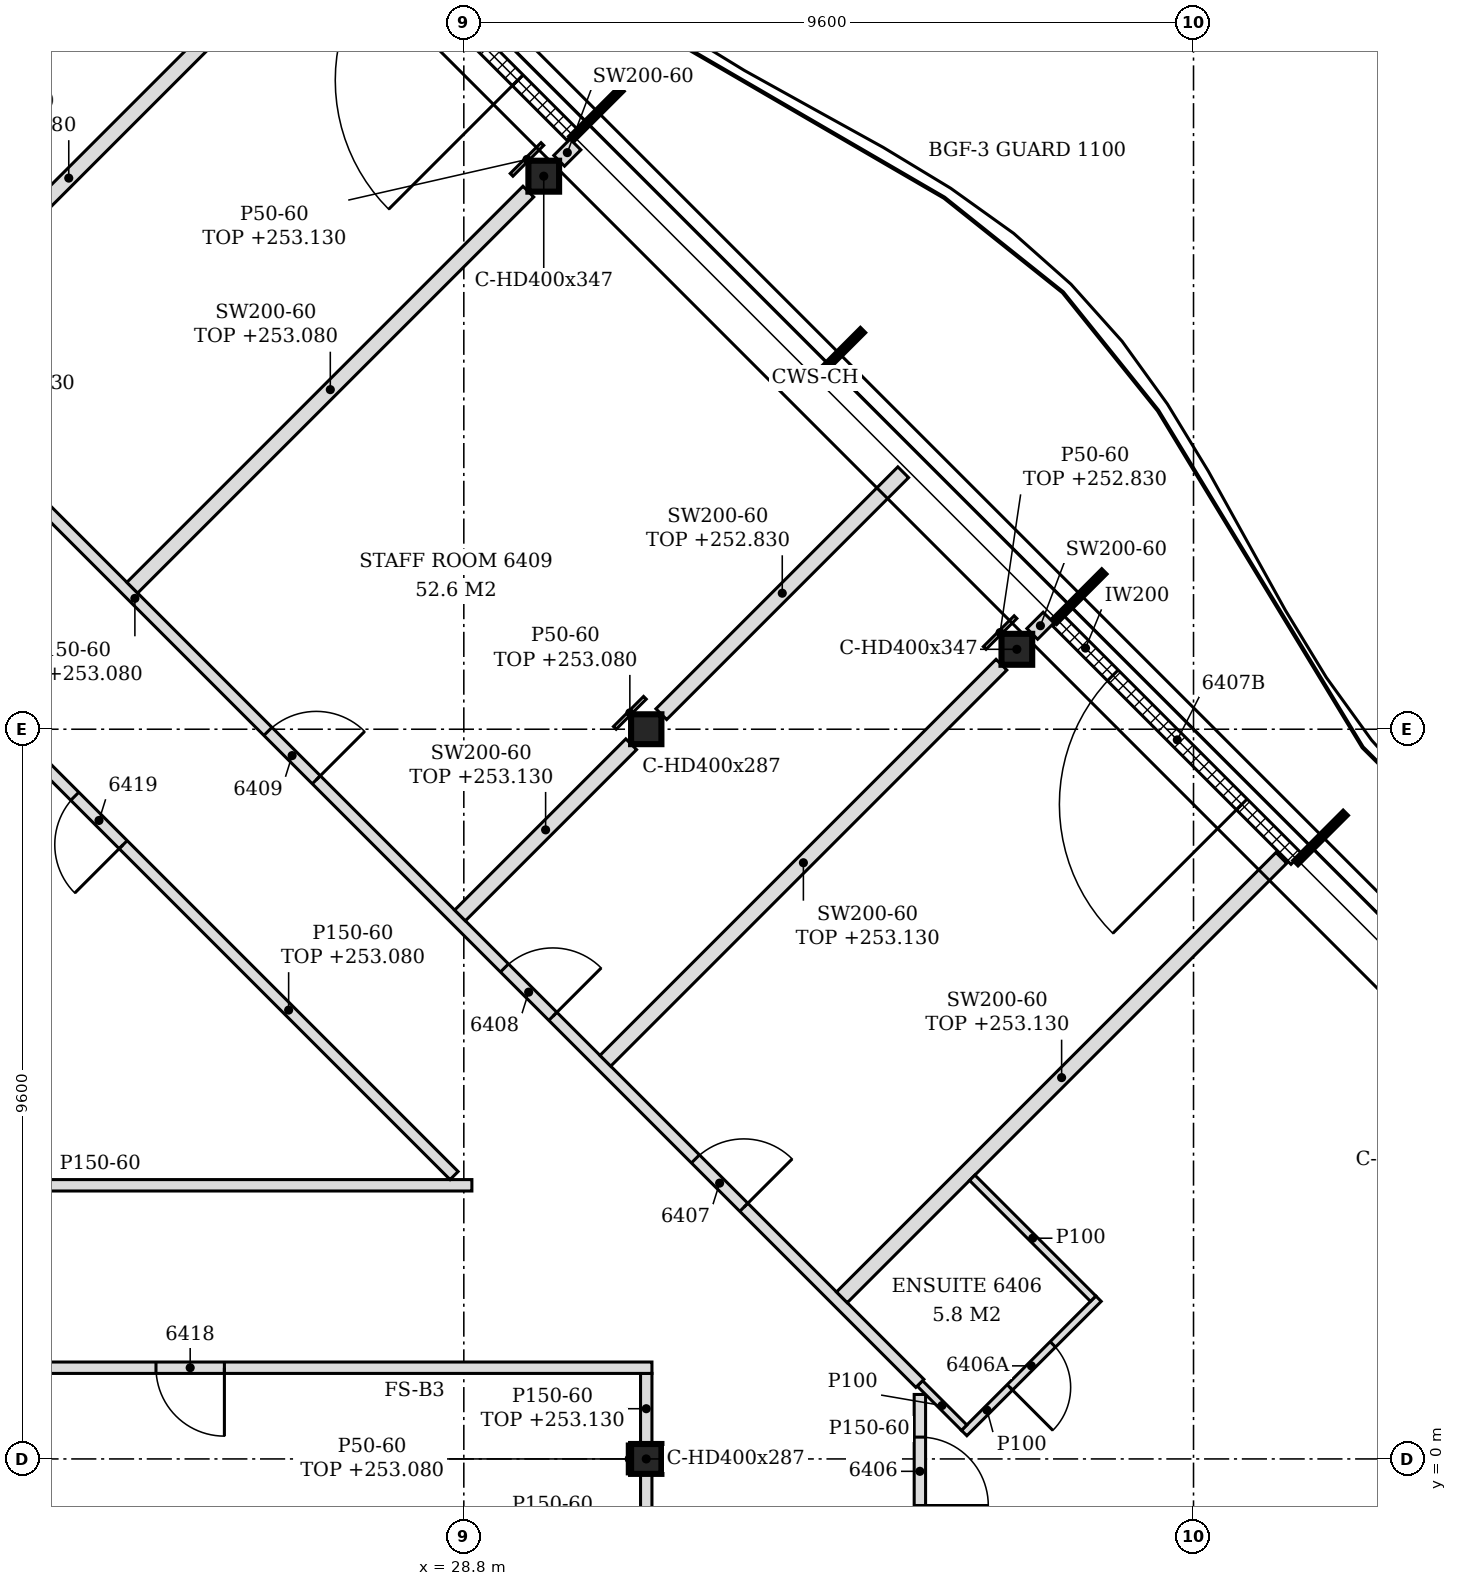
"""IFC4 building model, lengths in metres.
Left out: names, types, materials, properties, quantities, classifications, styles, units other than length and angle.
Written with IfcOpenShell. Run it as: python <this file> out.ifc"""

import sys

from ifc_helpers import new_model, si_unit, direction, frame, frame_2d, origin, origin_2d, place, context, subcontext, project, spatial, polyline, rectangle, i_section, outline, extrude, element, fill, save


model = new_model("IFC4")
c1 = context("Model", 3, precision=1e-05, world=origin(), true_north=direction((0.0, 1.0)))
c2 = subcontext(c1, "Body", "Model", "MODEL_VIEW")
j1 = project(units=[si_unit("LENGTHUNIT", "METRE"), si_unit("PLANEANGLEUNIT", "RADIAN")], contexts=[c1])
p1 = place(None, origin())
s1 = spatial("IfcSite", under=j1, at=p1, CompositionType="ELEMENT")
p2 = place(p1, origin())
s2 = spatial("IfcBuilding", under=s1, at=p2, CompositionType="ELEMENT")
p3 = place(p2, frame((0.0, 0.0, 250.2)))
s3 = spatial("IfcBuildingStorey", under=s2, at=p3, CompositionType="ELEMENT", Elevation=250.2)
for number, where, z_axis, x_axis in (
    (1, (36.076, 10.652, -0.15), (0.0, 0.0, 1.0), (1.0, 0.0, 0.0)),
    (2, (29.852, 16.876, -0.15), (0.0, 0.0, 1.0), (1.0, 0.0, 0.0)),
):
    element("IfcColumn", number, at=place(p3, frame(where, z_axis=z_axis, x_axis=x_axis)), inside=s3, PredefinedType="COLUMN", context=c2, shape_type="SweptSolid", body=[
        extrude(i_section(OverallWidth=0.404, OverallDepth=0.407, WebThickness=0.027, FlangeThickness=0.044, FilletRadius=0.015, at=origin_2d()), origin(), (0.0, 0.0, 1.0), 3.6),
    ])
for number, where, z_axis, x_axis in (
    (3, (31.2, 0.0, -0.15), (0.0, 0.0, 1.0), (1.0, 0.0, 0.0)),
    (4, (31.2, 9.6, -0.15), (0.0, 0.0, 1.0), (1.0, 0.0, 0.0)),
):
    element("IfcColumn", number, at=place(p3, frame(where, z_axis=z_axis, x_axis=x_axis)), inside=s3, PredefinedType="COLUMN", context=c2, shape_type="SweptSolid", body=[
        extrude(i_section(OverallWidth=0.399, OverallDepth=0.393, WebThickness=0.023, FlangeThickness=0.037, FilletRadius=0.015, at=origin_2d()), origin(), (0.0, 0.0, 1.0), 3.6),
    ])
p4 = place(p3, frame((39.753, 7.893, 0.0), z_axis=(0.0, 0.0, 1.0), x_axis=(-0.707106781187, 0.707106781187, 0.0)))
e5 = element("IfcWall", 5, at=p4, inside=s3, PredefinedType="NOTDEFINED", context=c2, shape_type="SweptSolid", body=[
    extrude(rectangle(XDim=4.431, YDim=0.2, at=frame_2d((2.215, 0.0))), origin(), (0.0, 0.0, 1.0), 3.45),
])
p5 = place(p4, frame((1.015, 0.0, 0.0)))
e6 = element("IfcOpeningElement", 6, at=p5, cuts=e5, PredefinedType="OPENING", context=c2, shape_type="SweptSolid", body=[
    extrude(rectangle(XDim=2.4, YDim=2.4, at=frame_2d((1.2, 1.2))), frame((0.0, 0.11, 0.0), z_axis=(0.0, -1.0, 0.0), x_axis=(1.0, 0.0, 0.0)), (0.0, 0.0, 1.0), 0.22),
])
p6 = place(p3, frame((30.226, 17.42, 0.0), z_axis=(0.0, 0.0, 1.0), x_axis=(-0.707079231393, 0.707134329907, 0.0)))
e7 = element("IfcWall", 7, at=p6, inside=s3, PredefinedType="NOTDEFINED", context=c2, shape_type="SweptSolid", body=[
    extrude(rectangle(XDim=4.431, YDim=0.2, at=frame_2d((2.215, 0.0))), origin(), (0.0, 0.0, 1.0), 3.45),
])
p7 = place(p6, frame((1.015, 0.0, 0.0)))
e8 = element("IfcOpeningElement", 8, at=p7, cuts=e7, PredefinedType="OPENING", context=c2, shape_type="SweptSolid", body=[
    extrude(rectangle(XDim=2.4, YDim=2.4, at=frame_2d((1.2, 1.2))), frame((0.0, 0.11, 0.0), z_axis=(0.0, -1.0, 0.0), x_axis=(1.0, 0.0, 0.0)), (0.0, 0.0, 1.0), 0.22),
])
p8 = place(p3, frame((31.2, -1.345, 0.0), z_axis=(0.0, 0.0, 1.0), x_axis=(0.0, 1.0, 0.0)))
e9 = element("IfcWall", 9, at=p8, inside=s3, PredefinedType="PARTITIONING", context=c2, shape_type="SweptSolid", body=[
    extrude(rectangle(XDim=1.148, YDim=0.15, at=frame_2d((0.574, 0.0))), origin(), (0.0, 0.0, 1.0), 2.93),
])
p9 = place(p3, frame((34.8, -1.14, 0.0), z_axis=(0.0, 0.0, 1.0), x_axis=(0.0, 1.0, 0.0)))
e10 = element("IfcWall", 10, at=p9, inside=s3, PredefinedType="PARTITIONING", context=c2, shape_type="SweptSolid", body=[
    extrude(outline(polyline([(0.0, 0.0), (1.988, 0.0), (1.988, 3.45), (1.245, 3.45), (1.243, 2.88), (1.035, 2.88), (1.033, 3.45), (0.0, 3.45), (0.0, 0.0)])), frame((0.0, 0.075, 0.0), z_axis=(0.0, -1.0, 0.0), x_axis=(1.0, 0.0, 0.0)), (0.0, 0.0, 1.0), 0.15),
])
p10 = place(p9, frame((0.527, 0.0, 0.0)))
e11 = element("IfcOpeningElement", 11, at=p10, cuts=e10, PredefinedType="OPENING", context=c2, shape_type="SweptSolid", body=[
    extrude(rectangle(XDim=0.9, YDim=2.1, at=frame_2d((0.45, 1.05))), frame((0.0, 0.085, 0.0), z_axis=(0.0, -1.0, 0.0), x_axis=(1.0, 0.0, 0.0)), (0.0, 0.0, 1.0), 0.17),
])
p11 = place(p3, frame((31.2, 0.197, 0.0), z_axis=(0.0, 0.0, 1.0), x_axis=(0.0, 1.0, 0.0)))
e12 = element("IfcWall", 12, at=p11, inside=s3, PredefinedType="PARTITIONING", context=c2, shape_type="SweptSolid", body=[
    extrude(rectangle(XDim=0.928, YDim=0.15, at=frame_2d((0.464, 0.0))), origin(), (0.0, 0.0, 1.0), 2.93),
])
p12 = place(p3, frame((35.383, 0.341, 0.0), z_axis=(0.0, 0.0, 1.0), x_axis=(0.707106781187, 0.707106781187, 0.0)))
e13 = element("IfcWall", 13, at=p12, inside=s3, PredefinedType="PARTITIONING", context=c2, shape_type="SweptSolid", body=[
    extrude(rectangle(XDim=2.5, YDim=0.1, at=frame_2d((1.25, 0.0))), origin(), (0.0, 0.0, 1.0), 3.45),
])
p13 = place(p12, frame((0.85, 0.0, 0.0)))
e14 = element("IfcOpeningElement", 14, at=p13, cuts=e13, PredefinedType="OPENING", context=c2, shape_type="SweptSolid", body=[
    extrude(rectangle(XDim=0.8, YDim=2.1, at=frame_2d((0.4, 1.05))), frame((0.0, 0.06, 0.0), z_axis=(0.0, -1.0, 0.0), x_axis=(1.0, 0.0, 0.0)), (0.0, 0.0, 1.0), 0.12),
])
p14 = place(p3, frame((35.383, 0.411, 0.0), z_axis=(0.0, 0.0, 1.0), x_axis=(-0.707106781187, 0.707106781187, 0.0)))
e15 = element("IfcWall", 15, at=p14, inside=s3, PredefinedType="PARTITIONING", context=c2, shape_type="SweptSolid", body=[
    extrude(rectangle(XDim=0.824, YDim=0.1, at=frame_2d((0.412, 0.0))), origin(), (0.0, 0.0, 1.0), 3.45),
])
p15 = place(p3, frame((34.8, 0.994, 0.0), z_axis=(0.0, 0.0, 1.0), x_axis=(-0.707099634543, 0.707113927758, 0.0)))
e16 = element("IfcWall", 16, at=p15, inside=s3, PredefinedType="PARTITIONING", context=c2, shape_type="SweptSolid", body=[
    extrude(rectangle(XDim=17.081, YDim=0.15, at=frame_2d((8.541, 0.0))), origin(), (0.0, 0.0, 1.0), 2.88),
])
p16 = place(p15, frame((3.276, 0.0, 0.0)))
e17 = element("IfcOpeningElement", 17, at=p16, cuts=e16, PredefinedType="OPENING", context=c2, shape_type="SweptSolid", body=[
    extrude(rectangle(XDim=0.9, YDim=2.1, at=frame_2d((0.45, 1.05))), frame((0.0, 0.085, 0.0), z_axis=(0.0, -1.0, 0.0), x_axis=(1.0, 0.0, 0.0)), (0.0, 0.0, 1.0), 0.17),
])
p17 = place(p15, frame((6.829, 0.0, 0.0)))
e18 = element("IfcOpeningElement", 18, at=p17, cuts=e16, PredefinedType="OPENING", context=c2, shape_type="SweptSolid", body=[
    extrude(rectangle(XDim=0.9, YDim=2.1, at=frame_2d((0.45, 1.05))), frame((0.0, 0.085, 0.0), z_axis=(0.0, -1.0, 0.0), x_axis=(1.0, 0.0, 0.0)), (0.0, 0.0, 1.0), 0.17),
])
p18 = place(p15, frame((11.23, 0.0, 0.0)))
e19 = element("IfcOpeningElement", 19, at=p18, cuts=e16, PredefinedType="OPENING", context=c2, shape_type="SweptSolid", body=[
    extrude(rectangle(XDim=0.9, YDim=2.1, at=frame_2d((0.45, 1.05))), frame((0.0, 0.085, 0.0), z_axis=(0.0, -1.0, 0.0), x_axis=(1.0, 0.0, 0.0)), (0.0, 0.0, 1.0), 0.17),
])
p19 = place(p3, frame((19.125, 1.2, 0.0), z_axis=(0.0, 0.0, 1.0), x_axis=(1.0, 0.0, 0.0)))
e20 = element("IfcWall", 20, at=p19, inside=s3, PredefinedType="PARTITIONING", context=c2, shape_type="SweptSolid", body=[
    extrude(outline(polyline([(0.0, 0.0), (12.15, 0.0), (12.15, 2.93), (11.925, 2.93), (11.923, 3.45), (0.225, 3.45), (0.223, 2.83), (0.0, 2.83), (0.0, 0.0)])), frame((0.0, 0.075, 0.0), z_axis=(0.0, -1.0, 0.0), x_axis=(1.0, 0.0, 0.0)), (0.0, 0.0, 1.0), 0.15),
])
p20 = place(p19, frame((5.625, 0.0, 0.0)))
e21 = element("IfcOpeningElement", 21, at=p20, cuts=e20, PredefinedType="OPENING", context=c2, shape_type="SweptSolid", body=[
    extrude(rectangle(XDim=0.9, YDim=2.1, at=frame_2d((0.45, 1.05))), frame((0.0, 0.085, 0.0), z_axis=(0.0, -1.0, 0.0), x_axis=(1.0, 0.0, 0.0)), (0.0, 0.0, 1.0), 0.17),
])
p21 = place(p3, frame((33.774, 2.126, 0.0), z_axis=(0.0, 0.0, 1.0), x_axis=(0.707121711178, 0.70709185088, 0.0)))
e22 = element("IfcWall", 22, at=p21, inside=s3, PredefinedType="PARTITIONING", context=c2, shape_type="SweptSolid", body=[
    extrude(rectangle(XDim=8.176, YDim=0.2, at=frame_2d((4.088, 0.0))), origin(), (0.0, 0.0, 1.0), 2.93),
])
p22 = place(p3, frame((37.08, 2.108, 0.0), z_axis=(0.0, 0.0, 1.0), x_axis=(-0.707106781187, 0.707106781187, 0.0)))
e23 = element("IfcWall", 23, at=p22, inside=s3, PredefinedType="PARTITIONING", context=c2, shape_type="SweptSolid", body=[
    extrude(rectangle(XDim=2.25, YDim=0.1, at=frame_2d((1.125, 0.0))), origin(), (0.0, 0.0, 1.0), 3.45),
])
p23 = place(p3, frame((19.125, 3.6, 0.0), z_axis=(0.0, 0.0, 1.0), x_axis=(1.0, 0.0, 0.0)))
e24 = element("IfcWall", 24, at=p23, inside=s3, PredefinedType="PARTITIONING", context=c2, shape_type="SweptSolid", body=[
    extrude(outline(polyline([(0.0, 0.0), (9.781, 0.0), (9.781, 3.45), (0.225, 3.45), (0.223, 2.83), (0.0, 2.83), (0.0, 0.0)])), frame((0.0, 0.075, 0.0), z_axis=(0.0, -1.0, 0.0), x_axis=(1.0, 0.0, 0.0)), (0.0, 0.0, 1.0), 0.15),
])
p24 = place(p3, frame((28.672, 3.728, 0.0), z_axis=(0.0, 0.0, 1.0), x_axis=(-0.707106781187, 0.707106781187, 0.0)))
e25 = element("IfcWall", 25, at=p24, inside=s3, PredefinedType="PARTITIONING", context=c2, shape_type="SweptSolid", body=[
    extrude(rectangle(XDim=13.124, YDim=0.15, at=frame_2d((6.562, 0.0))), origin(), (0.0, 0.0, 1.0), 2.88),
])
p25 = place(p24, frame((6.157, 0.0, 0.0)))
e26 = element("IfcOpeningElement", 26, at=p25, cuts=e25, PredefinedType="OPENING", context=c2, shape_type="SweptSolid", body=[
    extrude(rectangle(XDim=0.9, YDim=2.1, at=frame_2d((0.45, 1.05))), frame((0.0, 0.085, 0.0), z_axis=(0.0, -1.0, 0.0), x_axis=(1.0, 0.0, 0.0)), (0.0, 0.0, 1.0), 0.17),
])
p26 = place(p3, frame((30.662, 5.238, 0.0), z_axis=(0.0, 0.0, 1.0), x_axis=(0.707106781187, 0.707106781187, 0.0)))
e27 = element("IfcWall", 27, at=p26, inside=s3, PredefinedType="PARTITIONING", context=c2, shape_type="SweptSolid", body=[
    extrude(rectangle(XDim=7.369, YDim=0.2, at=frame_2d((3.685, 0.0))), origin(), (0.0, 0.0, 1.0), 2.93),
])
p27 = place(p3, frame((28.75, 7.15, 0.0), z_axis=(0.0, 0.0, 1.0), x_axis=(0.7070684525, 0.707145107796, 0.0)))
e28 = element("IfcWall", 28, at=p27, inside=s3, PredefinedType="PARTITIONING", context=c2, shape_type="SweptSolid", body=[
    extrude(rectangle(XDim=3.185, YDim=0.2, at=frame_2d((1.592, 0.0))), origin(), (0.0, 0.0, 1.0), 2.93),
])
p28 = place(p3, frame((31.398, 9.798, 0.0), z_axis=(0.0, 0.0, 1.0), x_axis=(0.707133900936, 0.707079660397, 0.0)))
e29 = element("IfcWall", 29, at=p28, inside=s3, PredefinedType="PARTITIONING", context=c2, shape_type="SweptSolid", body=[
    extrude(rectangle(XDim=4.501, YDim=0.2, at=frame_2d((2.25, 0.0))), origin(), (0.0, 0.0, 1.0), 2.63),
])
p29 = place(p3, frame((36.278, 10.854, 0.0), z_axis=(0.0, 0.0, 1.0), x_axis=(0.707509117806, 0.706704215511, 0.0)))
e30 = element("IfcWall", 30, at=p29, inside=s3, PredefinedType="PARTITIONING", context=c2, shape_type="SweptSolid", body=[
    extrude(rectangle(XDim=0.303, YDim=0.2, at=frame_2d((0.152, 0.0))), origin(), (0.0, 0.0, 1.0), 3.45),
])
p30 = place(p3, frame((24.438, 11.462, 0.0), z_axis=(0.0, 0.0, 1.0), x_axis=(0.707090216072, 0.707123345913, 0.0)))
e31 = element("IfcWall", 31, at=p30, inside=s3, PredefinedType="PARTITIONING", context=c2, shape_type="SweptSolid", body=[
    extrude(rectangle(XDim=7.369, YDim=0.2, at=frame_2d((3.685, 0.0))), origin(), (0.0, 0.0, 1.0), 2.88),
])
p31 = place(p3, frame((20.098, 13.346, 0.0), z_axis=(0.0, 0.0, 1.0), x_axis=(0.707119095079, 0.70709446708, 0.0)))
e32 = element("IfcWall", 32, at=p31, inside=s3, PredefinedType="PARTITIONING", context=c2, shape_type="SweptSolid", body=[
    extrude(rectangle(XDim=9.913, YDim=0.2, at=frame_2d((4.957, 0.0))), origin(), (0.0, 0.0, 1.0), 2.88),
])
p32 = place(p3, frame((30.054, 17.078, 0.0), z_axis=(0.0, 0.0, 1.0), x_axis=(0.707106781187, 0.707106781187, 0.0)))
e33 = element("IfcWall", 33, at=p32, inside=s3, PredefinedType="PARTITIONING", context=c2, shape_type="SweptSolid", body=[
    extrude(rectangle(XDim=0.303, YDim=0.2, at=frame_2d((0.152, 0.0))), origin(), (0.0, 0.0, 1.0), 3.45),
])
p33 = place(p3, frame((30.976, -0.197, 0.0), z_axis=(0.0, 0.0, 1.0), x_axis=(0.0, 1.0, 0.0)))
e34 = element("IfcWall", 34, at=p33, inside=s3, PredefinedType="PARTITIONING", context=c2, shape_type="SweptSolid", body=[
    extrude(rectangle(XDim=0.393, YDim=0.05, at=frame_2d((0.197, 0.0))), origin(), (0.0, 0.0, 1.0), 2.88),
])
p34 = place(p3, frame((35.653, 10.669, 0.0), z_axis=(0.0, 0.0, 1.0), x_axis=(0.707106781187, 0.707106781187, 0.0)))
e35 = element("IfcWall", 35, at=p34, inside=s3, PredefinedType="PARTITIONING", context=c2, shape_type="SweptSolid", body=[
    extrude(rectangle(XDim=0.573, YDim=0.05, at=frame_2d((0.287, 0.0))), origin(), (0.0, 0.0, 1.0), 2.63),
])
p35 = place(p3, frame((30.786, 9.618, 0.0), z_axis=(0.0, 0.0, 1.0), x_axis=(0.707106781187, 0.707106781187, 0.0)))
e36 = element("IfcWall", 36, at=p35, inside=s3, PredefinedType="PARTITIONING", context=c2, shape_type="SweptSolid", body=[
    extrude(rectangle(XDim=0.56, YDim=0.05, at=frame_2d((0.28, 0.0))), origin(), (0.0, 0.0, 1.0), 2.88),
])
p36 = place(p3, frame((29.428, 16.893, 0.0), z_axis=(0.0, 0.0, 1.0), x_axis=(0.707106781187, 0.707106781187, 0.0)))
e37 = element("IfcWall", 37, at=p36, inside=s3, PredefinedType="PARTITIONING", context=c2, shape_type="SweptSolid", body=[
    extrude(rectangle(XDim=0.573, YDim=0.05, at=frame_2d((0.287, 0.0))), origin(), (0.0, 0.0, 1.0), 2.93),
])
p37 = place(p5, origin())
e38 = element("IfcDoor", 38, at=p37, inside=s3, OperationType="SINGLE_SWING_LEFT", PredefinedType="DOOR", context=c2, shape_type="SweptSolid", body=[
    extrude(rectangle(XDim=2.4, YDim=2.4, at=frame_2d((1.2, 1.2))), frame((0.0, 0.025, 0.0), z_axis=(0.0, -1.0, 0.0), x_axis=(1.0, 0.0, 0.0)), (0.0, 0.0, 1.0), 0.05),
])
fill(e6, e38)
p38 = place(p7, origin())
e39 = element("IfcDoor", 39, at=p38, inside=s3, OperationType="SINGLE_SWING_LEFT", PredefinedType="DOOR", context=c2, shape_type="SweptSolid", body=[
    extrude(rectangle(XDim=2.4, YDim=2.4, at=frame_2d((1.2, 1.2))), frame((0.0, 0.025, 0.0), z_axis=(0.0, -1.0, 0.0), x_axis=(1.0, 0.0, 0.0)), (0.0, 0.0, 1.0), 0.05),
])
fill(e8, e39)
p39 = place(p10, frame((0.9, 0.0, 0.0), z_axis=(0.0, 0.0, 1.0), x_axis=(-1.0, 0.0, 0.0)))
e40 = element("IfcDoor", 40, at=p39, inside=s3, OperationType="SINGLE_SWING_RIGHT", PredefinedType="DOOR", context=c2, shape_type="SweptSolid", body=[
    extrude(rectangle(XDim=0.9, YDim=2.1, at=frame_2d((0.45, 1.05))), frame((0.0, 0.025, 0.0), z_axis=(0.0, -1.0, 0.0), x_axis=(1.0, 0.0, 0.0)), (0.0, 0.0, 1.0), 0.05),
])
fill(e11, e40)
p40 = place(p13, frame((0.8, 0.0, 0.0), z_axis=(0.0, 0.0, 1.0), x_axis=(-1.0, 0.0, 0.0)))
e41 = element("IfcDoor", 41, at=p40, inside=s3, OperationType="SINGLE_SWING_RIGHT", PredefinedType="DOOR", context=c2, shape_type="SweptSolid", body=[
    extrude(rectangle(XDim=0.8, YDim=2.1, at=frame_2d((0.4, 1.05))), frame((0.0, 0.025, 0.0), z_axis=(0.0, -1.0, 0.0), x_axis=(1.0, 0.0, 0.0)), (0.0, 0.0, 1.0), 0.05),
])
fill(e14, e41)
p41 = place(p16, frame((0.9, 0.0, 0.0), z_axis=(0.0, 0.0, 1.0), x_axis=(-1.0, 0.0, 0.0)))
e42 = element("IfcDoor", 42, at=p41, inside=s3, OperationType="SINGLE_SWING_RIGHT", PredefinedType="DOOR", context=c2, shape_type="SweptSolid", body=[
    extrude(rectangle(XDim=0.9, YDim=2.1, at=frame_2d((0.45, 1.05))), frame((0.0, 0.025, 0.0), z_axis=(0.0, -1.0, 0.0), x_axis=(1.0, 0.0, 0.0)), (0.0, 0.0, 1.0), 0.05),
])
fill(e17, e42)
p42 = place(p17, frame((0.9, 0.0, 0.0), z_axis=(0.0, 0.0, 1.0), x_axis=(-1.0, 0.0, 0.0)))
e43 = element("IfcDoor", 43, at=p42, inside=s3, OperationType="SINGLE_SWING_RIGHT", PredefinedType="DOOR", context=c2, shape_type="SweptSolid", body=[
    extrude(rectangle(XDim=0.9, YDim=2.1, at=frame_2d((0.45, 1.05))), frame((0.0, 0.025, 0.0), z_axis=(0.0, -1.0, 0.0), x_axis=(1.0, 0.0, 0.0)), (0.0, 0.0, 1.0), 0.05),
])
fill(e18, e43)
p43 = place(p18, frame((0.9, 0.0, 0.0), z_axis=(0.0, 0.0, 1.0), x_axis=(-1.0, 0.0, 0.0)))
e44 = element("IfcDoor", 44, at=p43, inside=s3, OperationType="SINGLE_SWING_RIGHT", PredefinedType="DOOR", context=c2, shape_type="SweptSolid", body=[
    extrude(rectangle(XDim=0.9, YDim=2.1, at=frame_2d((0.45, 1.05))), frame((0.0, 0.025, 0.0), z_axis=(0.0, -1.0, 0.0), x_axis=(1.0, 0.0, 0.0)), (0.0, 0.0, 1.0), 0.05),
])
fill(e19, e44)
p44 = place(p20, frame((0.9, 0.0, 0.0), z_axis=(0.0, 0.0, 1.0), x_axis=(-1.0, 0.0, 0.0)))
e45 = element("IfcDoor", 45, at=p44, inside=s3, OperationType="SINGLE_SWING_LEFT", PredefinedType="DOOR", context=c2, shape_type="SweptSolid", body=[
    extrude(rectangle(XDim=0.9, YDim=2.1, at=frame_2d((0.45, 1.05))), frame((0.0, 0.025, 0.0), z_axis=(0.0, -1.0, 0.0), x_axis=(1.0, 0.0, 0.0)), (0.0, 0.0, 1.0), 0.05),
])
fill(e21, e45)
p45 = place(p25, origin())
e46 = element("IfcDoor", 46, at=p45, inside=s3, OperationType="SINGLE_SWING_LEFT", PredefinedType="DOOR", context=c2, shape_type="SweptSolid", body=[
    extrude(rectangle(XDim=0.9, YDim=2.1, at=frame_2d((0.45, 1.05))), frame((0.0, 0.025, 0.0), z_axis=(0.0, -1.0, 0.0), x_axis=(1.0, 0.0, 0.0)), (0.0, 0.0, 1.0), 0.05),
])
fill(e26, e46)
save(model, sys.argv[1])
